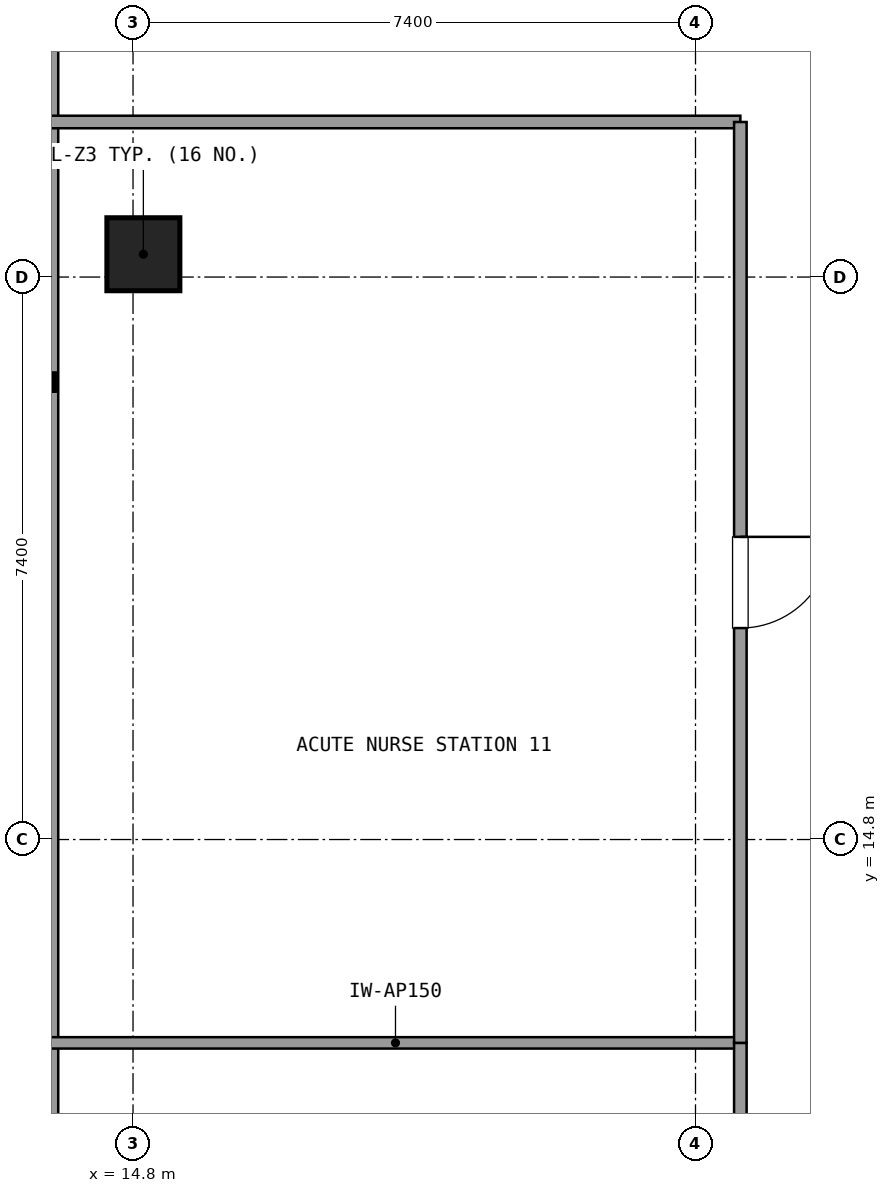
"""IFC4 building model, lengths in metres.
Left out: names, types, materials, properties, quantities, classifications, styles, units other than length and angle.
Written with IfcOpenShell. Run it as: python <this file> out.ifc"""

import sys

from ifc_helpers import new_model, si_unit, direction, frame, frame_2d, origin, origin_2d, place, context, subcontext, project, spatial, rectangle, extrude, element, fill, save


model = new_model("IFC4")
c1 = context("Model", 3, precision=1e-05, world=origin(), true_north=direction((0.0, 1.0)))
c2 = subcontext(c1, "Body", "Model", "MODEL_VIEW")
j1 = project(units=[si_unit("LENGTHUNIT", "METRE"), si_unit("PLANEANGLEUNIT", "RADIAN")], contexts=[c1])
p1 = place(None, origin())
s1 = spatial("IfcSite", under=j1, at=p1, CompositionType="ELEMENT")
p2 = place(p1, origin())
s2 = spatial("IfcBuilding", under=s1, at=p2, CompositionType="ELEMENT")
p3 = place(p2, frame((0.0, 0.0, 138.42)))
s3 = spatial("IfcBuildingStorey", under=s2, at=p3, CompositionType="ELEMENT", Elevation=138.42)
p4 = place(p3, frame((14.936, 22.5, 0.0), z_axis=(0.0, 0.0, 1.0), x_axis=(1.0, 0.0, 0.0)))
e1 = element("IfcColumn", 1, at=p4, inside=s3, PredefinedType="COLUMN", context=c2, shape_type="SweptSolid", body=[
    extrude(rectangle(XDim=0.96, YDim=0.96, at=origin_2d()), origin(), (0.0, 0.0, 1.0), 3.6),
])
p5 = place(p3, frame((13.696, 41.145, 0.0), z_axis=(0.0, 0.0, 1.0), x_axis=(0.0, -1.0, 0.0)))
e2 = element("IfcWall", 2, at=p5, inside=s3, PredefinedType="SOLIDWALL", context=c2, shape_type="SweptSolid", body=[
    extrude(rectangle(XDim=30.49, YDim=0.24, at=frame_2d((15.245, 0.0))), origin(), (0.0, 0.0, 1.0), 0.85),
])
p6 = place(p3, frame((13.716, 24.24, 0.0), z_axis=(0.0, 0.0, 1.0), x_axis=(1.0, 0.0, 0.0)))
e3 = element("IfcWall", 3, at=p6, inside=s3, PredefinedType="PARTITIONING", context=c2, shape_type="SweptSolid", body=[
    extrude(rectangle(XDim=9.074, YDim=0.165, at=frame_2d((4.537, 0.0))), origin(), (0.0, 0.0, 1.0), 2.61),
])
p7 = place(p3, frame((22.79, 12.125, 0.0), z_axis=(0.0, 0.0, 1.0), x_axis=(-1.0, 0.0, 0.0)))
e4 = element("IfcWall", 4, at=p7, inside=s3, PredefinedType="PARTITIONING", context=c2, shape_type="SweptSolid", body=[
    extrude(rectangle(XDim=9.074, YDim=0.15, at=frame_2d((4.537, 0.0))), origin(), (0.0, 0.0, 1.0), 2.61),
])
p8 = place(p3, frame((22.79, 4.7, 0.0), z_axis=(0.0, 0.0, 1.0), x_axis=(0.0, 1.0, 0.0)))
e5 = element("IfcWall", 5, at=p8, inside=s3, PredefinedType="PARTITIONING", context=c2, shape_type="SweptSolid", body=[
    extrude(rectangle(XDim=7.425, YDim=0.165, at=frame_2d((3.712, 0.0))), origin(), (0.0, 0.0, 1.0), 2.61),
])
p9 = place(p8, frame((3.112, 0.0, 0.0)))
e6 = element("IfcOpeningElement", 6, at=p9, cuts=e5, PredefinedType="OPENING", context=c2, shape_type="SweptSolid", body=[
    extrude(rectangle(XDim=1.2, YDim=2.15, at=frame_2d((0.6, 1.075))), frame((0.0, 0.093, 0.0), z_axis=(0.0, -1.0, 0.0), x_axis=(1.0, 0.0, 0.0)), (0.0, 0.0, 1.0), 0.185),
])
p10 = place(p3, frame((22.79, 12.125, 0.0), z_axis=(0.0, 0.0, 1.0), x_axis=(0.0, 1.0, 0.0)))
e7 = element("IfcWall", 7, at=p10, inside=s3, PredefinedType="PARTITIONING", context=c2, shape_type="SweptSolid", body=[
    extrude(rectangle(XDim=12.115, YDim=0.165, at=frame_2d((6.058, 0.0))), origin(), (0.0, 0.0, 1.0), 2.61),
])
p11 = place(p10, frame((5.457, 0.0, 0.0)))
e8 = element("IfcOpeningElement", 8, at=p11, cuts=e7, PredefinedType="OPENING", context=c2, shape_type="SweptSolid", body=[
    extrude(rectangle(XDim=1.2, YDim=2.15, at=frame_2d((0.6, 1.075))), frame((0.0, 0.093, 0.0), z_axis=(0.0, -1.0, 0.0), x_axis=(1.0, 0.0, 0.0)), (0.0, 0.0, 1.0), 0.185),
])
p12 = place(p11, frame((1.2, 0.0, 0.0), z_axis=(0.0, 0.0, 1.0), x_axis=(-1.0, 0.0, 0.0)))
e9 = element("IfcDoor", 9, at=p12, inside=s3, OperationType="SINGLE_SWING_RIGHT", PredefinedType="DOOR", context=c2, shape_type="SweptSolid", body=[
    extrude(rectangle(XDim=1.2, YDim=2.15, at=frame_2d((0.6, 1.075))), frame((0.0, 0.025, 0.0), z_axis=(0.0, -1.0, 0.0), x_axis=(1.0, 0.0, 0.0)), (0.0, 0.0, 1.0), 0.05),
])
fill(e8, e9)
save(model, sys.argv[1])
